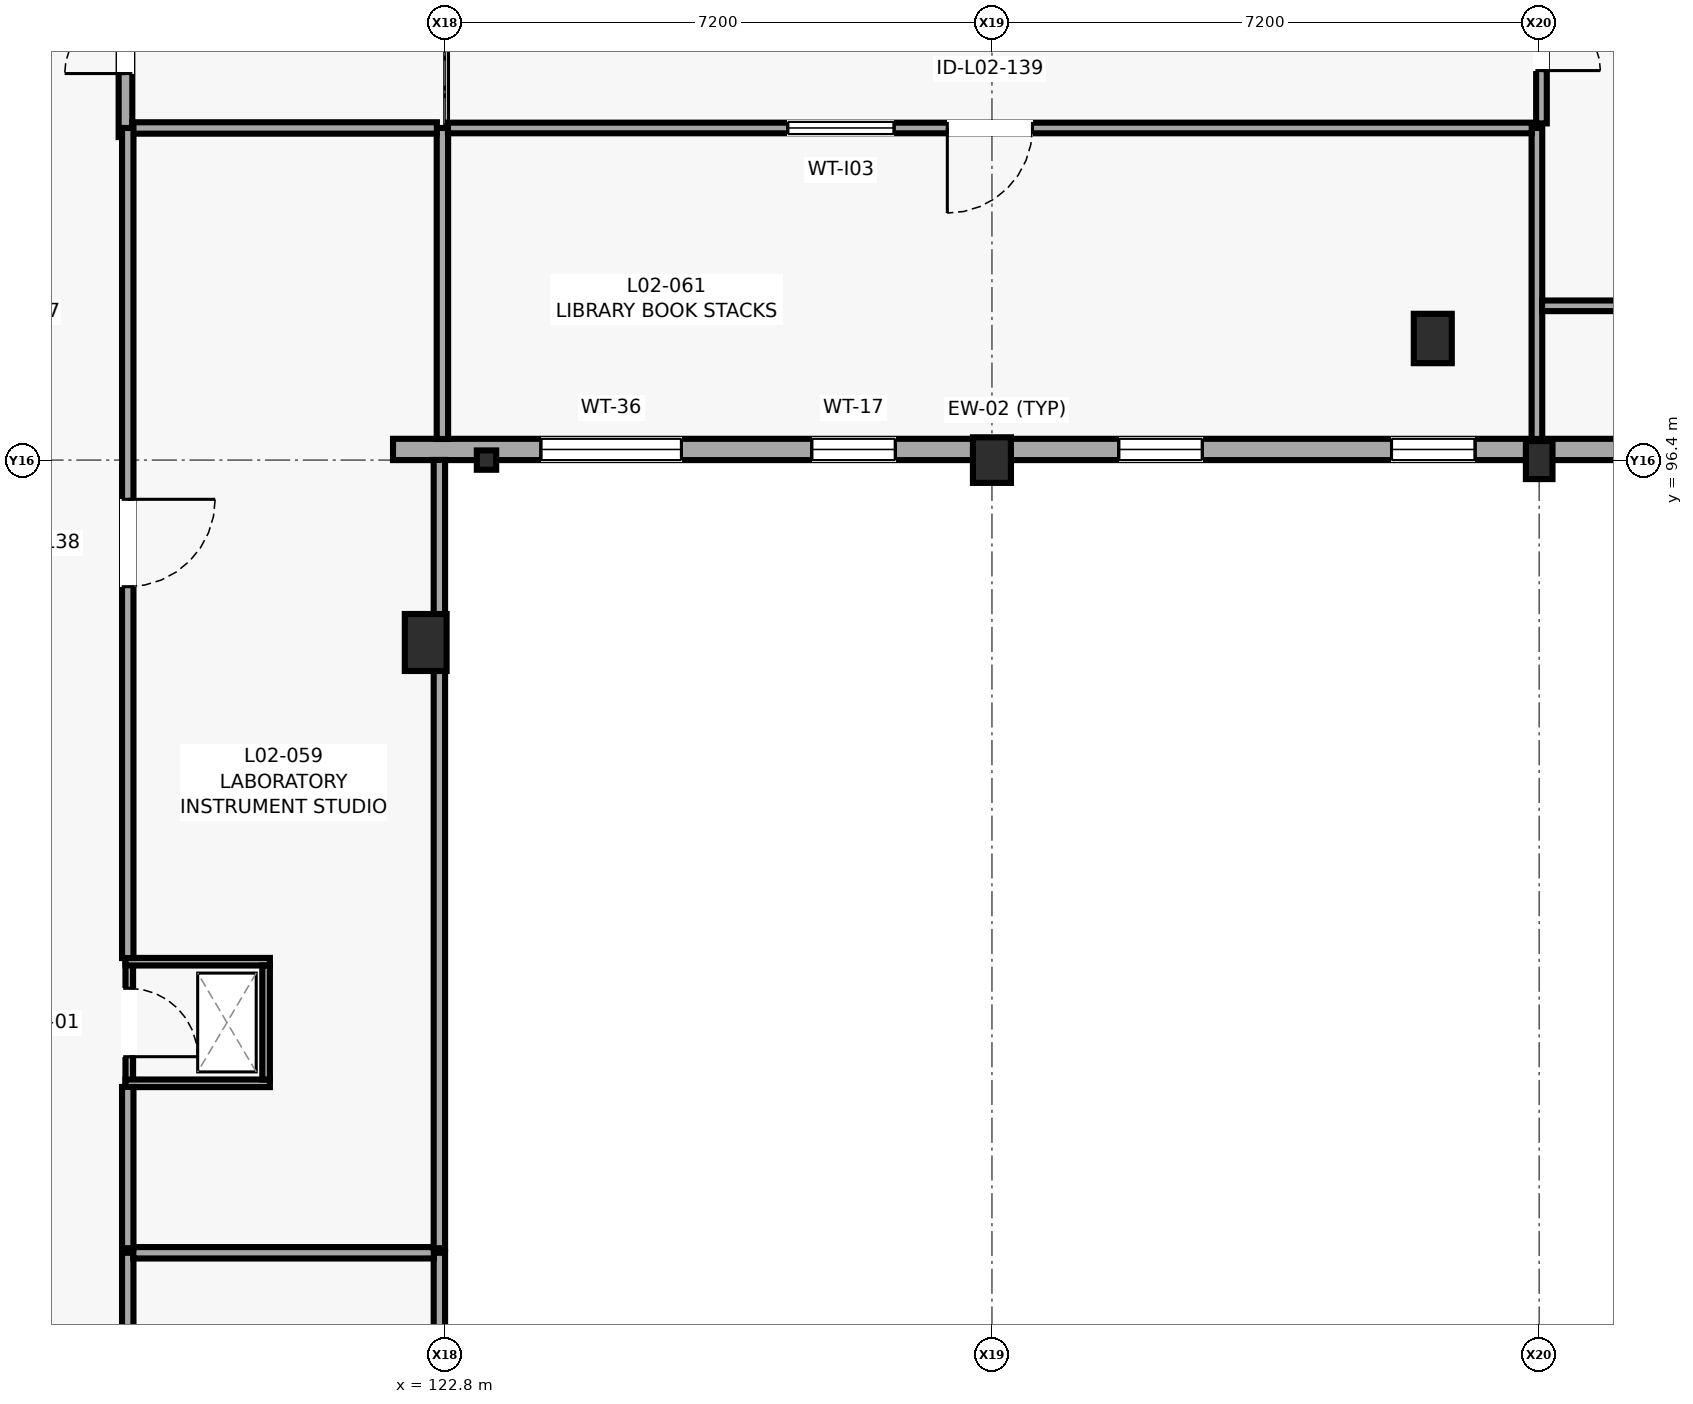
"""IFC4 building model, lengths in metres.
Left out: names, types, materials, properties, quantities, classifications, styles, units other than length and angle.
Written with IfcOpenShell. Run it as: python <this file> out.ifc"""

import sys

from ifc_helpers import new_model, si_unit, direction, frame, frame_2d, origin, origin_2d, place, context, subcontext, project, spatial, rectangle, i_section, extrude, element, fill, save


model = new_model("IFC4")
c1 = context("Model", 3, precision=1e-05, world=origin(), true_north=direction((0.0, 1.0)))
c2 = subcontext(c1, "Body", "Model", "MODEL_VIEW")
j1 = project(units=[si_unit("LENGTHUNIT", "METRE"), si_unit("PLANEANGLEUNIT", "RADIAN")], contexts=[c1])
p1 = place(None, origin())
s1 = spatial("IfcSite", under=j1, at=p1, CompositionType="ELEMENT")
p2 = place(p1, origin())
s2 = spatial("IfcBuilding", under=s1, at=p2, CompositionType="ELEMENT")
p3 = place(p2, frame((0.0, 0.0, 8.2)))
s3 = spatial("IfcBuildingStorey", under=s2, at=p3, CompositionType="ELEMENT", Elevation=8.2)
p4 = place(p3, frame((122.55, 94.0, 0.0), z_axis=(0.0, 0.0, 1.0), x_axis=(1.0, 0.0, 0.0)))
e1 = element("IfcColumn", 1, at=p4, inside=s3, PredefinedType="COLUMN", context=c2, shape_type="SweptSolid", body=[
    extrude(rectangle(XDim=0.55, YDim=0.75, at=origin_2d()), origin(), (0.0, 0.0, 1.0), 4.0),
])
p5 = place(p3, frame((123.35, 96.4, 0.0), z_axis=(0.0, 0.0, 1.0), x_axis=(1.0, 0.0, 0.0)))
e2 = element("IfcColumn", 2, at=p5, inside=s3, PredefinedType="COLUMN", context=c2, shape_type="SweptSolid", body=[
    extrude(i_section(OverallWidth=0.255, OverallDepth=0.254, WebThickness=0.009, FlangeThickness=0.014, FilletRadius=0.013, at=origin_2d()), origin(), (0.0, 0.0, 1.0), 4.0),
])
p6 = place(p3, frame((130.0, 96.4, 0.0), z_axis=(0.0, 0.0, 1.0), x_axis=(1.0, 0.0, 0.0)))
e3 = element("IfcColumn", 3, at=p6, inside=s3, PredefinedType="PILASTER", context=c2, shape_type="SweptSolid", body=[
    extrude(rectangle(XDim=0.5, YDim=0.6, at=origin_2d()), origin(), (0.0, 0.0, 1.0), 4.0),
])
p7 = place(p3, frame((135.8, 98.0, 0.0), z_axis=(0.0, 0.0, 1.0), x_axis=(1.0, 0.0, 0.0)))
e4 = element("IfcColumn", 4, at=p7, inside=s3, PredefinedType="COLUMN", context=c2, shape_type="SweptSolid", body=[
    extrude(rectangle(XDim=0.5, YDim=0.65, at=origin_2d()), origin(), (0.0, 0.0, 1.0), 4.0),
])
p8 = place(p3, frame((137.2, 96.4, 0.0), z_axis=(0.0, 0.0, 1.0), x_axis=(1.0, 0.0, 0.0)))
e5 = element("IfcColumn", 5, at=p8, inside=s3, PredefinedType="PILASTER", context=c2, shape_type="SweptSolid", body=[
    extrude(rectangle(XDim=0.35, YDim=0.5, at=origin_2d()), origin(), (0.0, 0.0, 1.0), 4.0),
])
p9 = place(p3, frame((122.12, 96.54, 0.0), z_axis=(0.0, 0.0, 1.0), x_axis=(1.0, 0.0, 0.0)))
e6 = element("IfcWall", 6, at=p9, inside=s3, PredefinedType="SOLIDWALL", context=c2, shape_type="SweptSolid", body=[
    extrude(rectangle(XDim=16.156, YDim=0.28, at=frame_2d((8.078, 0.0))), origin(), (0.0, 0.0, 1.0), 2.915),
])
p10 = place(p9, frame((1.945, 0.0, 1.05)))
e7 = element("IfcOpeningElement", 7, at=p10, cuts=e6, PredefinedType="OPENING", context=c2, shape_type="SweptSolid", body=[
    extrude(rectangle(XDim=1.85, YDim=1.4, at=frame_2d((0.925, 0.7))), frame((0.0, 0.15, 0.0), z_axis=(0.0, -1.0, 0.0), x_axis=(1.0, 0.0, 0.0)), (0.0, 0.0, 1.0), 0.3),
])
p11 = place(p9, frame((5.509, 0.0, 0.675)))
e8 = element("IfcOpeningElement", 8, at=p11, cuts=e6, PredefinedType="OPENING", context=c2, shape_type="SweptSolid", body=[
    extrude(rectangle(XDim=1.1, YDim=2.1, at=frame_2d((0.55, 1.05))), frame((0.0, 0.15, 0.0), z_axis=(0.0, -1.0, 0.0), x_axis=(1.0, 0.0, 0.0)), (0.0, 0.0, 1.0), 0.3),
])
p12 = place(p9, frame((9.548, 0.0, 0.675)))
e9 = element("IfcOpeningElement", 9, at=p12, cuts=e6, PredefinedType="OPENING", context=c2, shape_type="SweptSolid", body=[
    extrude(rectangle(XDim=1.1, YDim=2.1, at=frame_2d((0.55, 1.05))), frame((0.0, 0.15, 0.0), z_axis=(0.0, -1.0, 0.0), x_axis=(1.0, 0.0, 0.0)), (0.0, 0.0, 1.0), 0.3),
])
p13 = place(p9, frame((13.137, 0.0, 0.675)))
e10 = element("IfcOpeningElement", 10, at=p13, cuts=e6, PredefinedType="OPENING", context=c2, shape_type="SweptSolid", body=[
    extrude(rectangle(XDim=1.1, YDim=2.1, at=frame_2d((0.55, 1.05))), frame((0.0, 0.15, 0.0), z_axis=(0.0, -1.0, 0.0), x_axis=(1.0, 0.0, 0.0)), (0.0, 0.0, 1.0), 0.3),
])
p14 = place(p3, frame((118.6, 100.65, 0.0), z_axis=(0.0, 0.0, 1.0), x_axis=(0.0, 1.0, 0.0)))
e11 = element("IfcWall", 11, at=p14, inside=s3, PredefinedType="PARTITIONING", context=c2, shape_type="SweptSolid", body=[
    extrude(rectangle(XDim=3.272, YDim=0.18, at=frame_2d((1.636, 0.0))), origin(), (0.0, 0.0, 1.0), 3.78),
])
p15 = place(p14, frame((0.836, 0.0, 0.0)))
e12 = element("IfcOpeningElement", 12, at=p15, cuts=e11, PredefinedType="OPENING", context=c2, shape_type="SweptSolid", body=[
    extrude(rectangle(XDim=1.6, YDim=2.25, at=frame_2d((0.8, 1.125))), frame((0.0, 0.1, 0.0), z_axis=(0.0, -1.0, 0.0), x_axis=(1.0, 0.0, 0.0)), (0.0, 0.0, 1.0), 0.2),
])
p16 = place(p3, frame((118.65, 88.2, 0.0), z_axis=(0.0, 0.0, 1.0), x_axis=(0.0, 1.0, 0.0)))
e13 = element("IfcWall", 13, at=p16, inside=s3, PredefinedType="PARTITIONING", context=c2, shape_type="SweptSolid", body=[
    extrude(rectangle(XDim=1.6, YDim=0.1, at=frame_2d((0.8, 0.0))), origin(), (0.0, 0.0, 1.0), 3.165),
])
p17 = place(p16, frame((0.35, 0.0, 0.0)))
e14 = element("IfcOpeningElement", 14, at=p17, cuts=e13, PredefinedType="OPENING", context=c2, shape_type="SweptSolid", body=[
    extrude(rectangle(XDim=0.9, YDim=2.05, at=frame_2d((0.45, 1.025))), frame((0.0, 0.06, 0.0), z_axis=(0.0, -1.0, 0.0), x_axis=(1.0, 0.0, 0.0)), (0.0, 0.0, 1.0), 0.12),
])
for number, where, z_axis, x_axis in (
    (15, (118.6, 88.2, 0.0), (0.0, 0.0, 1.0), (1.0, 0.0, 0.0)),
    (16, (118.6, 89.8, 0.0), (0.0, 0.0, 1.0), (1.0, 0.0, 0.0)),
):
    element("IfcWall", number, at=place(p3, frame(where, z_axis=z_axis, x_axis=x_axis)), inside=s3, PredefinedType="PARTITIONING", context=c2, shape_type="SweptSolid", body=[
        extrude(rectangle(XDim=1.9, YDim=0.1, at=frame_2d((0.95, 0.0))), origin(), (0.0, 0.0, 1.0), 3.78),
    ])
p18 = place(p3, frame((120.45, 88.25, 0.0), z_axis=(0.0, 0.0, 1.0), x_axis=(0.0, 1.0, 0.0)))
e17 = element("IfcWall", 17, at=p18, inside=s3, PredefinedType="PARTITIONING", context=c2, shape_type="SweptSolid", body=[
    extrude(rectangle(XDim=1.5, YDim=0.1, at=frame_2d((0.75, 0.0))), origin(), (0.0, 0.0, 1.0), 3.78),
])
p19 = place(p3, frame((118.63, 85.97, 0.0), z_axis=(0.0, 0.0, 1.0), x_axis=(0.0, -1.0, 0.0)))
e18 = element("IfcWall", 18, at=p19, inside=s3, PredefinedType="PARTITIONING", context=c2, shape_type="SweptSolid", body=[
    extrude(rectangle(XDim=14.092, YDim=0.15, at=frame_2d((7.046, 0.0))), origin(), (0.0, 0.0, 1.0), 3.165),
])
p20 = place(p19, frame((6.571, 0.0, 0.0)))
e19 = element("IfcOpeningElement", 19, at=p20, cuts=e18, PredefinedType="OPENING", context=c2, shape_type="SweptSolid", body=[
    extrude(rectangle(XDim=0.95, YDim=2.1, at=frame_2d((0.475, 1.05))), frame((0.0, 0.085, 0.0), z_axis=(0.0, -1.0, 0.0), x_axis=(1.0, 0.0, 0.0)), (0.0, 0.0, 1.0), 0.17),
])
p21 = place(p3, frame((122.73, 71.878, 0.0), z_axis=(0.0, 0.0, 1.0), x_axis=(0.0, 1.0, 0.0)))
e20 = element("IfcWall", 20, at=p21, inside=s3, PredefinedType="PARTITIONING", context=c2, shape_type="SweptSolid", body=[
    extrude(rectangle(XDim=14.092, YDim=0.15, at=frame_2d((7.046, 0.0))), origin(), (0.0, 0.0, 1.0), 3.115),
])
p22 = place(p3, frame((122.657, 85.97, 0.0), z_axis=(0.0, 0.0, 1.0), x_axis=(-1.0, 0.0, 0.0)))
e21 = element("IfcWall", 21, at=p22, inside=s3, PredefinedType="PARTITIONING", context=c2, shape_type="SweptSolid", body=[
    extrude(rectangle(XDim=3.954, YDim=0.15, at=frame_2d((1.977, 0.0))), origin(), (0.0, 0.0, 1.0), 3.715),
])
p23 = place(p3, frame((122.77, 96.678, 0.0), z_axis=(0.0, 0.0, 1.0), x_axis=(0.0, 1.0, 0.0)))
e22 = element("IfcWall", 22, at=p23, inside=s3, PredefinedType="PARTITIONING", context=c2, shape_type="SweptSolid", body=[
    extrude(rectangle(XDim=4.092, YDim=0.15, at=frame_2d((2.046, 0.0))), origin(), (0.0, 0.0, 1.0), 3.715),
])
p24 = place(p3, frame((122.697, 100.77, 0.0), z_axis=(0.0, 0.0, 1.0), x_axis=(-1.0, 0.0, 0.0)))
e23 = element("IfcWall", 23, at=p24, inside=s3, PredefinedType="PARTITIONING", context=c2, shape_type="SweptSolid", body=[
    extrude(rectangle(XDim=4.009, YDim=0.15, at=frame_2d((2.004, 0.0))), origin(), (0.0, 0.0, 1.0), 3.715),
])
p25 = place(p3, frame((118.63, 100.77, 0.0), z_axis=(0.0, 0.0, 1.0), x_axis=(0.0, -1.0, 0.0)))
e24 = element("IfcWall", 24, at=p25, inside=s3, PredefinedType="PARTITIONING", context=c2, shape_type="SweptSolid", body=[
    extrude(rectangle(XDim=10.922, YDim=0.15, at=frame_2d((5.461, 0.0))), origin(), (0.0, 0.0, 1.0), 3.165),
])
p26 = place(p25, frame((4.886, 0.0, 0.0)))
e25 = element("IfcOpeningElement", 25, at=p26, cuts=e24, PredefinedType="OPENING", context=c2, shape_type="SweptSolid", body=[
    extrude(rectangle(XDim=1.15, YDim=2.2, at=frame_2d((0.575, 1.1))), frame((0.0, 0.085, 0.0), z_axis=(0.0, -1.0, 0.0), x_axis=(1.0, 0.0, 0.0)), (0.0, 0.0, 1.0), 0.17),
])
p27 = place(p3, frame((118.63, 88.152, 0.0), z_axis=(0.0, 0.0, 1.0), x_axis=(0.0, -1.0, 0.0)))
e26 = element("IfcWall", 26, at=p27, inside=s3, PredefinedType="PARTITIONING", context=c2, shape_type="SweptSolid", body=[
    extrude(rectangle(XDim=2.122, YDim=0.15, at=frame_2d((1.061, 0.0))), origin(), (0.0, 0.0, 1.0), 3.165),
])
p28 = place(p3, frame((122.73, 86.03, 0.0), z_axis=(0.0, 0.0, 1.0), x_axis=(0.0, 1.0, 0.0)))
e27 = element("IfcWall", 27, at=p28, inside=s3, PredefinedType="PARTITIONING", context=c2, shape_type="SweptSolid", body=[
    extrude(rectangle(XDim=10.372, YDim=0.15, at=frame_2d((5.186, 0.0))), origin(), (0.0, 0.0, 1.0), 3.215),
])
p29 = place(p3, frame((137.17, 96.678, 0.0), z_axis=(0.0, 0.0, 1.0), x_axis=(0.0, 1.0, 0.0)))
e28 = element("IfcWall", 28, at=p29, inside=s3, PredefinedType="PARTITIONING", context=c2, shape_type="SweptSolid", body=[
    extrude(rectangle(XDim=4.092, YDim=0.14, at=frame_2d((2.046, 0.0))), origin(), (0.0, 0.0, 1.0), 3.115),
])
p30 = place(p3, frame((137.102, 100.77, 0.0), z_axis=(0.0, 0.0, 1.0), x_axis=(-1.0, 0.0, 0.0)))
e29 = element("IfcWall", 29, at=p30, inside=s3, PredefinedType="PARTITIONING", context=c2, shape_type="SweptSolid", body=[
    extrude(rectangle(XDim=14.259, YDim=0.14, at=frame_2d((7.129, 0.0))), origin(), (0.0, 0.0, 1.0), 3.715),
])
p31 = place(p30, frame((6.569, 0.0, 0.0)))
e30 = element("IfcOpeningElement", 30, at=p31, cuts=e29, PredefinedType="OPENING", context=c2, shape_type="SweptSolid", body=[
    extrude(rectangle(XDim=1.12, YDim=2.18, at=frame_2d((0.56, 1.09))), frame((0.0, 0.08, 0.0), z_axis=(0.0, -1.0, 0.0), x_axis=(1.0, 0.0, 0.0)), (0.0, 0.0, 1.0), 0.16),
])
p32 = place(p30, frame((8.389, 0.0, 1.05)))
e31 = element("IfcOpeningElement", 31, at=p32, cuts=e29, PredefinedType="OPENING", context=c2, shape_type="SweptSolid", body=[
    extrude(rectangle(XDim=1.4, YDim=1.05, at=frame_2d((0.7, 0.525))), frame((0.0, 0.08, 0.0), z_axis=(0.0, -1.0, 0.0), x_axis=(1.0, 0.0, 0.0)), (0.0, 0.0, 1.0), 0.16),
])
p33 = place(p3, frame((137.238, 98.43, 0.0), z_axis=(0.0, 0.0, 1.0), x_axis=(1.0, 0.0, 0.0)))
e32 = element("IfcWall", 32, at=p33, inside=s3, PredefinedType="PARTITIONING", context=c2, shape_type="SweptSolid", body=[
    extrude(rectangle(XDim=17.932, YDim=0.14, at=frame_2d((8.966, 0.0))), origin(), (0.0, 0.0, 1.0), 3.78),
])
p34 = place(p3, frame((137.23, 103.77, 0.0), z_axis=(0.0, 0.0, 1.0), x_axis=(0.0, -1.0, 0.0)))
e33 = element("IfcWall", 33, at=p34, inside=s3, PredefinedType="PARTITIONING", context=c2, shape_type="SweptSolid", body=[
    extrude(rectangle(XDim=2.94, YDim=0.14, at=frame_2d((1.47, 0.0))), origin(), (0.0, 0.0, 1.0), 3.115),
])
p35 = place(p34, frame((0.695, 0.0, 0.0)))
e34 = element("IfcOpeningElement", 34, at=p35, cuts=e33, PredefinedType="OPENING", context=c2, shape_type="SweptSolid", body=[
    extrude(rectangle(XDim=1.55, YDim=2.3, at=frame_2d((0.775, 1.15))), frame((0.0, 0.08, 0.0), z_axis=(0.0, -1.0, 0.0), x_axis=(1.0, 0.0, 0.0)), (0.0, 0.0, 1.0), 0.16),
])
p36 = place(p10, origin())
e35 = element("IfcWindow", 35, at=p36, inside=s3, PartitioningType="SINGLE_PANEL", PredefinedType="WINDOW", context=c2, shape_type="SweptSolid", body=[
    extrude(rectangle(XDim=1.85, YDim=1.4, at=frame_2d((0.925, 0.7))), frame((0.0, 0.03, 0.0), z_axis=(0.0, -1.0, 0.0), x_axis=(1.0, 0.0, 0.0)), (0.0, 0.0, 1.0), 0.06),
])
fill(e7, e35)
p37 = place(p11, origin())
e36 = element("IfcWindow", 36, at=p37, inside=s3, PartitioningType="SINGLE_PANEL", PredefinedType="WINDOW", context=c2, shape_type="SweptSolid", body=[
    extrude(rectangle(XDim=1.1, YDim=2.1, at=frame_2d((0.55, 1.05))), frame((0.0, 0.03, 0.0), z_axis=(0.0, -1.0, 0.0), x_axis=(1.0, 0.0, 0.0)), (0.0, 0.0, 1.0), 0.06),
])
fill(e8, e36)
p38 = place(p12, origin())
e37 = element("IfcWindow", 37, at=p38, inside=s3, PartitioningType="SINGLE_PANEL", PredefinedType="WINDOW", context=c2, shape_type="SweptSolid", body=[
    extrude(rectangle(XDim=1.1, YDim=2.1, at=frame_2d((0.55, 1.05))), frame((0.0, 0.03, 0.0), z_axis=(0.0, -1.0, 0.0), x_axis=(1.0, 0.0, 0.0)), (0.0, 0.0, 1.0), 0.06),
])
fill(e9, e37)
p39 = place(p13, origin())
e38 = element("IfcWindow", 38, at=p39, inside=s3, PartitioningType="SINGLE_PANEL", PredefinedType="WINDOW", context=c2, shape_type="SweptSolid", body=[
    extrude(rectangle(XDim=1.1, YDim=2.1, at=frame_2d((0.55, 1.05))), frame((0.0, 0.03, 0.0), z_axis=(0.0, -1.0, 0.0), x_axis=(1.0, 0.0, 0.0)), (0.0, 0.0, 1.0), 0.06),
])
fill(e10, e38)
p40 = place(p15, origin())
e39 = element("IfcDoor", 39, at=p40, inside=s3, OperationType="DOUBLE_DOOR_SINGLE_SWING", PredefinedType="DOOR", context=c2, shape_type="SweptSolid", body=[
    extrude(rectangle(XDim=1.6, YDim=2.25, at=frame_2d((0.8, 1.125))), frame((0.0, 0.025, 0.0), z_axis=(0.0, -1.0, 0.0), x_axis=(1.0, 0.0, 0.0)), (0.0, 0.0, 1.0), 0.05),
])
fill(e12, e39)
p41 = place(p17, frame((0.9, 0.0, 0.0), z_axis=(0.0, 0.0, 1.0), x_axis=(-1.0, 0.0, 0.0)))
e40 = element("IfcDoor", 40, at=p41, inside=s3, OperationType="SINGLE_SWING_LEFT", PredefinedType="USERDEFINED", context=c2, shape_type="SweptSolid", body=[
    extrude(rectangle(XDim=0.9, YDim=2.05, at=frame_2d((0.45, 1.025))), frame((0.0, 0.025, 0.0), z_axis=(0.0, -1.0, 0.0), x_axis=(1.0, 0.0, 0.0)), (0.0, 0.0, 1.0), 0.05),
])
fill(e14, e40)
p42 = place(p26, origin())
e41 = element("IfcDoor", 41, at=p42, inside=s3, OperationType="SINGLE_SWING_LEFT", PredefinedType="DOOR", context=c2, shape_type="SweptSolid", body=[
    extrude(rectangle(XDim=1.15, YDim=2.2, at=frame_2d((0.575, 1.1))), frame((0.0, 0.025, 0.0), z_axis=(0.0, -1.0, 0.0), x_axis=(1.0, 0.0, 0.0)), (0.0, 0.0, 1.0), 0.05),
])
fill(e25, e41)
p43 = place(p31, origin())
e42 = element("IfcDoor", 42, at=p43, inside=s3, OperationType="SINGLE_SWING_RIGHT", PredefinedType="DOOR", context=c2, shape_type="SweptSolid", body=[
    extrude(rectangle(XDim=1.12, YDim=2.18, at=frame_2d((0.56, 1.09))), frame((0.0, 0.025, 0.0), z_axis=(0.0, -1.0, 0.0), x_axis=(1.0, 0.0, 0.0)), (0.0, 0.0, 1.0), 0.05),
])
fill(e30, e42)
p44 = place(p32, origin())
e43 = element("IfcWindow", 43, at=p44, inside=s3, PartitioningType="SINGLE_PANEL", PredefinedType="WINDOW", context=c2, shape_type="SweptSolid", body=[
    extrude(rectangle(XDim=1.4, YDim=1.05, at=frame_2d((0.7, 0.525))), frame((0.0, 0.03, 0.0), z_axis=(0.0, -1.0, 0.0), x_axis=(1.0, 0.0, 0.0)), (0.0, 0.0, 1.0), 0.06),
])
fill(e31, e43)
p45 = place(p35, origin())
e44 = element("IfcDoor", 44, at=p45, inside=s3, OperationType="DOUBLE_DOOR_SINGLE_SWING", PredefinedType="DOOR", context=c2, shape_type="SweptSolid", body=[
    extrude(rectangle(XDim=1.55, YDim=2.3, at=frame_2d((0.775, 1.15))), frame((0.0, 0.025, 0.0), z_axis=(0.0, -1.0, 0.0), x_axis=(1.0, 0.0, 0.0)), (0.0, 0.0, 1.0), 0.05),
])
fill(e34, e44)
save(model, sys.argv[1])
